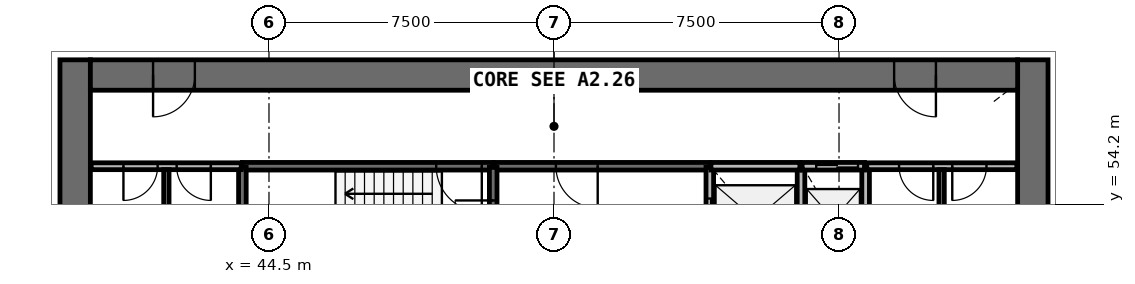
"""IFC4 building model, lengths in metres.
Left out: names, types, materials, properties, quantities, classifications, styles, units other than length and angle.
Written with IfcOpenShell. Run it as: python <this file> out.ifc"""

import sys

from ifc_helpers import new_model, si_unit, direction, frame, frame_2d, origin, place, context, subcontext, project, spatial, rectangle, extrude, source, transform, mapped, element, fill, save


model = new_model("IFC4")
c1 = context("Model", 3, precision=1e-05, world=origin(), true_north=direction((0.0, 1.0)))
c2 = subcontext(c1, "Body", "Model", "MODEL_VIEW")
j1 = project(units=[si_unit("LENGTHUNIT", "METRE"), si_unit("PLANEANGLEUNIT", "RADIAN")], contexts=[c1])
p1 = place(None, origin())
s1 = spatial("IfcSite", under=j1, at=p1, CompositionType="ELEMENT")
p2 = place(p1, origin())
s2 = spatial("IfcBuilding", under=s1, at=p2, CompositionType="ELEMENT")
p3 = place(p2, frame((0.0, 0.0, 108.5)))
s3 = spatial("IfcBuildingStorey", under=s2, at=p3, CompositionType="ELEMENT", Elevation=108.5)
p4 = place(p3, frame((64.6, 38.0, 0.0), z_axis=(0.0, 0.0, 1.0), x_axis=(0.0, 1.0, 0.0)))
e1 = element("IfcWall", 1, at=p4, inside=s3, PredefinedType="SHEAR", context=c2, shape_type="SweptSolid", body=[
    extrude(rectangle(XDim=20.0, YDim=0.8, at=frame_2d((10.0, 0.0))), origin(), (0.0, 0.0, 1.0), 4.1),
])
p5 = place(p4, frame((9.1, 0.0, 0.0)))
e2 = element("IfcOpeningElement", 2, at=p5, cuts=e1, PredefinedType="OPENING", context=c2, shape_type="SweptSolid", body=[
    extrude(rectangle(XDim=1.8, YDim=2.1, at=frame_2d((0.9, 1.05))), frame((0.0, 0.41, 0.0), z_axis=(0.0, -1.0, 0.0), x_axis=(1.0, 0.0, 0.0)), (0.0, 0.0, 1.0), 0.82),
])
p6 = place(p3, frame((39.4, 58.0, 0.0), z_axis=(0.0, 0.0, 1.0), x_axis=(0.0, -1.0, 0.0)))
e3 = element("IfcWall", 3, at=p6, inside=s3, PredefinedType="SHEAR", context=c2, shape_type="SweptSolid", body=[
    extrude(rectangle(XDim=20.0, YDim=0.8, at=frame_2d((10.0, 0.0))), origin(), (0.0, 0.0, 1.0), 4.1),
])
p7 = place(p6, frame((9.1, 0.0, 0.0)))
e4 = element("IfcOpeningElement", 4, at=p7, cuts=e3, PredefinedType="OPENING", context=c2, shape_type="SweptSolid", body=[
    extrude(rectangle(XDim=1.8, YDim=2.1, at=frame_2d((0.9, 1.05))), frame((0.0, 0.41, 0.0), z_axis=(0.0, -1.0, 0.0), x_axis=(1.0, 0.0, 0.0)), (0.0, 0.0, 1.0), 0.82),
])
p8 = place(p3, frame((64.2, 57.6, 0.0), z_axis=(0.0, 0.0, 1.0), x_axis=(-1.0, 0.0, 0.0)))
e5 = element("IfcWall", 5, at=p8, inside=s3, PredefinedType="SHEAR", context=c2, shape_type="SweptSolid", body=[
    extrude(rectangle(XDim=24.4, YDim=0.8, at=frame_2d((12.2, 0.0))), origin(), (0.0, 0.0, 1.0), 4.1),
])
p9 = place(p8, frame((21.65, 0.0, 0.0)))
e6 = element("IfcOpeningElement", 6, at=p9, cuts=e5, PredefinedType="OPENING", context=c2, shape_type="SweptSolid", body=[
    extrude(rectangle(XDim=1.1, YDim=2.1, at=frame_2d((0.55, 1.05))), frame((0.0, 0.41, 0.0), z_axis=(0.0, -1.0, 0.0), x_axis=(1.0, 0.0, 0.0)), (0.0, 0.0, 1.0), 0.82),
])
p10 = place(p8, frame((2.15, 0.0, 0.0)))
e7 = element("IfcOpeningElement", 7, at=p10, cuts=e5, PredefinedType="OPENING", context=c2, shape_type="SweptSolid", body=[
    extrude(rectangle(XDim=1.1, YDim=2.1, at=frame_2d((0.55, 1.05))), frame((0.0, 0.41, 0.0), z_axis=(0.0, -1.0, 0.0), x_axis=(1.0, 0.0, 0.0)), (0.0, 0.0, 1.0), 0.82),
])
p11 = place(p3, frame((50.4, 55.2, 0.0), z_axis=(0.0, 0.0, 1.0), x_axis=(-1.0, 0.0, 0.0)))
e8 = element("IfcWall", 8, at=p11, inside=s3, PredefinedType="SOLIDWALL", context=c2, shape_type="SweptSolid", body=[
    extrude(rectangle(XDim=6.6, YDim=0.2, at=frame_2d((3.3, 0.0))), origin(), (0.0, 0.0, 1.0), 3.7),
])
p12 = place(p11, frame((0.3, 0.0, 0.0)))
e9 = element("IfcOpeningElement", 9, at=p12, cuts=e8, PredefinedType="OPENING", context=c2, shape_type="SweptSolid", body=[
    extrude(rectangle(XDim=1.2, YDim=2.1, at=frame_2d((0.6, 1.05))), frame((0.0, 0.11, 0.0), z_axis=(0.0, -1.0, 0.0), x_axis=(1.0, 0.0, 0.0)), (0.0, 0.0, 1.0), 0.22),
])
p13 = place(p3, frame((56.1, 55.2, 0.0), z_axis=(0.0, 0.0, 1.0), x_axis=(-1.0, 0.0, 0.0)))
e10 = element("IfcWall", 10, at=p13, inside=s3, PredefinedType="SOLIDWALL", context=c2, shape_type="SweptSolid", body=[
    extrude(rectangle(XDim=5.67, YDim=0.2, at=frame_2d((2.835, 0.0))), origin(), (0.0, 0.0, 1.0), 3.7),
])
p14 = place(p13, frame((2.95, 0.0, 0.0)))
e11 = element("IfcOpeningElement", 11, at=p14, cuts=e10, PredefinedType="OPENING", context=c2, shape_type="SweptSolid", body=[
    extrude(rectangle(XDim=1.1, YDim=2.1, at=frame_2d((0.55, 1.05))), frame((0.0, 0.11, 0.0), z_axis=(0.0, -1.0, 0.0), x_axis=(1.0, 0.0, 0.0)), (0.0, 0.0, 1.0), 0.22),
])
p15 = place(p3, frame((50.4, 52.4, 0.0), z_axis=(0.0, 0.0, 1.0), x_axis=(0.0, 1.0, 0.0)))
e12 = element("IfcWall", 12, at=p15, inside=s3, PredefinedType="SOLIDWALL", context=c2, shape_type="SweptSolid", body=[
    extrude(rectangle(XDim=2.77, YDim=0.2, at=frame_2d((1.385, 0.0))), origin(), (0.0, 0.0, 1.0), 3.7),
])
p16 = place(p15, frame((0.9, 0.0, 0.0)))
e13 = element("IfcOpeningElement", 13, at=p16, cuts=e12, PredefinedType="OPENING", context=c2, shape_type="SweptSolid", body=[
    extrude(rectangle(XDim=1.0, YDim=2.1, at=frame_2d((0.5, 1.05))), frame((0.0, 0.11, 0.0), z_axis=(0.0, -1.0, 0.0), x_axis=(1.0, 0.0, 0.0)), (0.0, 0.0, 1.0), 0.22),
])
p17 = place(p3, frame((56.1, 55.17, 0.0), z_axis=(0.0, 0.0, 1.0), x_axis=(0.0, -1.0, 0.0)))
e14 = element("IfcWall", 14, at=p17, inside=s3, PredefinedType="SOLIDWALL", context=c2, shape_type="SweptSolid", body=[
    extrude(rectangle(XDim=2.77, YDim=0.2, at=frame_2d((1.385, 0.0))), origin(), (0.0, 0.0, 1.0), 3.7),
])
p18 = place(p17, frame((0.82, 0.0, 0.0)))
e15 = element("IfcOpeningElement", 15, at=p18, cuts=e14, PredefinedType="OPENING", context=c2, shape_type="SweptSolid", body=[
    extrude(rectangle(XDim=1.1, YDim=2.1, at=frame_2d((0.55, 1.05))), frame((0.0, 0.11, 0.0), z_axis=(0.0, -1.0, 0.0), x_axis=(1.0, 0.0, 0.0)), (0.0, 0.0, 1.0), 0.22),
])
for number, where, z_axis, x_axis in (
    (16, (58.5, 52.4, 0.0), (0.0, 0.0, 1.0), (0.0, 1.0, 0.0)),
    (17, (60.2, 52.4, 0.0), (0.0, 0.0, 1.0), (0.0, 1.0, 0.0)),
):
    element("IfcWall", number, at=place(p3, frame(where, z_axis=z_axis, x_axis=x_axis)), inside=s3, PredefinedType="SOLIDWALL", context=c2, shape_type="SweptSolid", body=[
        extrude(rectangle(XDim=2.8, YDim=0.2, at=frame_2d((1.4, 0.0))), origin(), (0.0, 0.0, 1.0), 3.7),
    ])
p19 = place(p3, frame((58.47, 55.2, 0.0), z_axis=(0.0, 0.0, 1.0), x_axis=(-1.0, 0.0, 0.0)))
e18 = element("IfcWall", 18, at=p19, inside=s3, PredefinedType="SOLIDWALL", context=c2, shape_type="SweptSolid", body=[
    extrude(rectangle(XDim=2.34, YDim=0.2, at=frame_2d((1.17, 0.0))), origin(), (0.0, 0.0, 1.0), 3.7),
])
p20 = place(p3, frame((43.8, 55.17, 0.0), z_axis=(0.0, 0.0, 1.0), x_axis=(0.0, -1.0, 0.0)))
e19 = element("IfcWall", 19, at=p20, inside=s3, PredefinedType="SOLIDWALL", context=c2, shape_type="SweptSolid", body=[
    extrude(rectangle(XDim=2.14, YDim=0.2, at=frame_2d((1.07, 0.0))), origin(), (0.0, 0.0, 1.0), 3.7),
])
p21 = place(p3, frame((60.17, 55.2, 0.0), z_axis=(0.0, 0.0, 1.0), x_axis=(-1.0, 0.0, 0.0)))
e20 = element("IfcWall", 20, at=p21, inside=s3, PredefinedType="SOLIDWALL", context=c2, shape_type="SweptSolid", body=[
    extrude(rectangle(XDim=1.64, YDim=0.2, at=frame_2d((0.82, 0.0))), origin(), (0.0, 0.0, 1.0), 3.7),
])
p22 = place(p21, frame((0.17, 0.0, 0.0)))
e21 = element("IfcOpeningElement", 21, at=p22, cuts=e20, PredefinedType="OPENING", context=c2, shape_type="SweptSolid", body=[
    extrude(rectangle(XDim=1.1, YDim=2.1, at=frame_2d((0.55, 1.05))), frame((0.0, 0.11, 0.0), z_axis=(0.0, -1.0, 0.0), x_axis=(1.0, 0.0, 0.0)), (0.0, 0.0, 1.0), 0.22),
])
p23 = place(p3, frame((64.18, 55.2, 0.0), z_axis=(0.0, 0.0, 1.0), x_axis=(-1.0, 0.0, 0.0)))
e22 = element("IfcWall", 22, at=p23, inside=s3, PredefinedType="PARTITIONING", context=c2, shape_type="SweptSolid", body=[
    extrude(rectangle(XDim=3.95, YDim=0.18, at=frame_2d((1.975, 0.0))), origin(), (0.0, 0.0, 1.0), 3.7),
])
p24 = place(p23, frame((2.2, 0.0, 0.0)))
e23 = element("IfcOpeningElement", 23, at=p24, cuts=e22, PredefinedType="OPENING", context=c2, shape_type="SweptSolid", body=[
    extrude(rectangle(XDim=0.9, YDim=2.1, at=frame_2d((0.45, 1.05))), frame((0.0, 0.1, 0.0), z_axis=(0.0, -1.0, 0.0), x_axis=(1.0, 0.0, 0.0)), (0.0, 0.0, 1.0), 0.2),
])
p25 = place(p23, frame((0.8, 0.0, 0.0)))
e24 = element("IfcOpeningElement", 24, at=p25, cuts=e22, PredefinedType="OPENING", context=c2, shape_type="SweptSolid", body=[
    extrude(rectangle(XDim=0.9, YDim=2.1, at=frame_2d((0.45, 1.05))), frame((0.0, 0.1, 0.0), z_axis=(0.0, -1.0, 0.0), x_axis=(1.0, 0.0, 0.0)), (0.0, 0.0, 1.0), 0.2),
])
p26 = place(p3, frame((43.77, 55.2, 0.0), z_axis=(0.0, 0.0, 1.0), x_axis=(-1.0, 0.0, 0.0)))
e25 = element("IfcWall", 25, at=p26, inside=s3, PredefinedType="PARTITIONING", context=c2, shape_type="SweptSolid", body=[
    extrude(rectangle(XDim=3.95, YDim=0.18, at=frame_2d((1.975, 0.0))), origin(), (0.0, 0.0, 1.0), 3.7),
])
p27 = place(p26, frame((2.2, 0.0, 0.0)))
e26 = element("IfcOpeningElement", 26, at=p27, cuts=e25, PredefinedType="OPENING", context=c2, shape_type="SweptSolid", body=[
    extrude(rectangle(XDim=0.9, YDim=2.1, at=frame_2d((0.45, 1.05))), frame((0.0, 0.1, 0.0), z_axis=(0.0, -1.0, 0.0), x_axis=(1.0, 0.0, 0.0)), (0.0, 0.0, 1.0), 0.2),
])
p28 = place(p26, frame((0.8, 0.0, 0.0)))
e27 = element("IfcOpeningElement", 27, at=p28, cuts=e25, PredefinedType="OPENING", context=c2, shape_type="SweptSolid", body=[
    extrude(rectangle(XDim=0.9, YDim=2.1, at=frame_2d((0.45, 1.05))), frame((0.0, 0.1, 0.0), z_axis=(0.0, -1.0, 0.0), x_axis=(1.0, 0.0, 0.0)), (0.0, 0.0, 1.0), 0.2),
])
p29 = place(p3, frame((62.2, 52.4, 0.0), z_axis=(0.0, 0.0, 1.0), x_axis=(0.0, 1.0, 0.0)))
e28 = element("IfcWall", 28, at=p29, inside=s3, PredefinedType="PARTITIONING", context=c2, shape_type="SweptSolid", body=[
    extrude(rectangle(XDim=2.71, YDim=0.14, at=frame_2d((1.355, 0.0))), origin(), (0.0, 0.0, 1.0), 2.9),
])
p30 = place(p3, frame((41.8, 53.1, 0.0), z_axis=(0.0, 0.0, 1.0), x_axis=(0.0, 1.0, 0.0)))
e29 = element("IfcWall", 29, at=p30, inside=s3, PredefinedType="PARTITIONING", context=c2, shape_type="SweptSolid", body=[
    extrude(rectangle(XDim=2.01, YDim=0.14, at=frame_2d((1.005, 0.0))), origin(), (0.0, 0.0, 1.0), 2.9),
])
m1 = source(origin(), c2, "Body", "SweptSolid", [
    extrude(rectangle(XDim=1.1, YDim=2.1, at=frame_2d((0.55, 1.05))), frame((0.0, 0.025, 0.0), z_axis=(0.0, -1.0, 0.0), x_axis=(1.0, 0.0, 0.0)), (0.0, 0.0, 1.0), 0.05),
])
p31 = place(p18, origin())
e30 = element("IfcDoor", 30, at=p31, inside=s3, OperationType="DOUBLE_DOOR_SLIDING", PredefinedType="USERDEFINED", context=c2, shape_type="MappedRepresentation", body=[
    mapped(m1, transform((0.0, 0.0, 0.0), scale=1.0)),
])
fill(e15, e30)
p32 = place(p22, origin())
e31 = element("IfcDoor", 31, at=p32, inside=s3, OperationType="DOUBLE_DOOR_SLIDING", PredefinedType="USERDEFINED", context=c2, shape_type="MappedRepresentation", body=[
    mapped(m1, transform((0.0, 0.0, 0.0), scale=1.0)),
])
fill(e21, e31)
m2 = source(origin(), c2, "Body", "SweptSolid", [
    extrude(rectangle(XDim=1.2, YDim=2.1, at=frame_2d((0.6, 1.05))), frame((0.0, 0.025, 0.0), z_axis=(0.0, -1.0, 0.0), x_axis=(1.0, 0.0, 0.0)), (0.0, 0.0, 1.0), 0.05),
])
p33 = place(p12, origin())
e32 = element("IfcDoor", 32, at=p33, inside=s3, OperationType="SINGLE_SWING_LEFT", PredefinedType="DOOR", context=c2, shape_type="MappedRepresentation", body=[
    mapped(m2, transform((0.0, 0.0, 0.0), scale=1.0)),
])
fill(e9, e32)
m3 = source(origin(), c2, "Body", "SweptSolid", [
    extrude(rectangle(XDim=1.0, YDim=2.1, at=frame_2d((0.5, 1.05))), frame((0.0, 0.025, 0.0), z_axis=(0.0, -1.0, 0.0), x_axis=(1.0, 0.0, 0.0)), (0.0, 0.0, 1.0), 0.05),
])
p34 = place(p16, origin())
e33 = element("IfcDoor", 33, at=p34, inside=s3, OperationType="SINGLE_SWING_RIGHT", PredefinedType="DOOR", context=c2, shape_type="MappedRepresentation", body=[
    mapped(m3, transform((0.0, 0.0, 0.0), scale=1.0)),
])
fill(e13, e33)
m4 = source(origin(), c2, "Body", "SweptSolid", [
    extrude(rectangle(XDim=1.1, YDim=2.1, at=frame_2d((0.55, 1.05))), frame((0.0, 0.025, 0.0), z_axis=(0.0, -1.0, 0.0), x_axis=(1.0, 0.0, 0.0)), (0.0, 0.0, 1.0), 0.05),
])
p35 = place(p14, origin())
e34 = element("IfcDoor", 34, at=p35, inside=s3, OperationType="SINGLE_SWING_LEFT", PredefinedType="DOOR", context=c2, shape_type="MappedRepresentation", body=[
    mapped(m4, transform((0.0, 0.0, 0.0), scale=1.0)),
])
fill(e11, e34)
m5 = source(origin(), c2, "Body", "SweptSolid", [
    extrude(rectangle(XDim=1.1, YDim=2.1, at=frame_2d((0.55, 1.05))), frame((0.0, 0.025, 0.0), z_axis=(0.0, -1.0, 0.0), x_axis=(1.0, 0.0, 0.0)), (0.0, 0.0, 1.0), 0.05),
])
p36 = place(p9, origin())
e35 = element("IfcDoor", 35, at=p36, inside=s3, OperationType="SINGLE_SWING_RIGHT", PredefinedType="DOOR", context=c2, shape_type="MappedRepresentation", body=[
    mapped(m5, transform((0.0, 0.0, 0.0), scale=1.0)),
])
fill(e6, e35)
p37 = place(p10, origin())
e36 = element("IfcDoor", 36, at=p37, inside=s3, OperationType="SINGLE_SWING_LEFT", PredefinedType="DOOR", context=c2, shape_type="MappedRepresentation", body=[
    mapped(m5, transform((0.0, 0.0, 0.0), scale=1.0)),
])
fill(e7, e36)
m6 = source(origin(), c2, "Body", "SweptSolid", [
    extrude(rectangle(XDim=0.9, YDim=2.1, at=frame_2d((0.45, 1.05))), frame((0.0, 0.025, 0.0), z_axis=(0.0, -1.0, 0.0), x_axis=(1.0, 0.0, 0.0)), (0.0, 0.0, 1.0), 0.05),
])
p38 = place(p27, origin())
e37 = element("IfcDoor", 37, at=p38, inside=s3, OperationType="SINGLE_SWING_RIGHT", PredefinedType="DOOR", context=c2, shape_type="MappedRepresentation", body=[
    mapped(m6, transform((0.0, 0.0, 0.0), scale=1.0)),
])
fill(e26, e37)
p39 = place(p28, origin())
e38 = element("IfcDoor", 38, at=p39, inside=s3, OperationType="SINGLE_SWING_LEFT", PredefinedType="DOOR", context=c2, shape_type="MappedRepresentation", body=[
    mapped(m6, transform((0.0, 0.0, 0.0), scale=1.0)),
])
fill(e27, e38)
p40 = place(p24, origin())
e39 = element("IfcDoor", 39, at=p40, inside=s3, OperationType="SINGLE_SWING_LEFT", PredefinedType="DOOR", context=c2, shape_type="MappedRepresentation", body=[
    mapped(m6, transform((0.0, 0.0, 0.0), scale=1.0)),
])
fill(e23, e39)
p41 = place(p25, origin())
e40 = element("IfcDoor", 40, at=p41, inside=s3, OperationType="SINGLE_SWING_RIGHT", PredefinedType="DOOR", context=c2, shape_type="MappedRepresentation", body=[
    mapped(m6, transform((0.0, 0.0, 0.0), scale=1.0)),
])
fill(e24, e40)
save(model, sys.argv[1])
